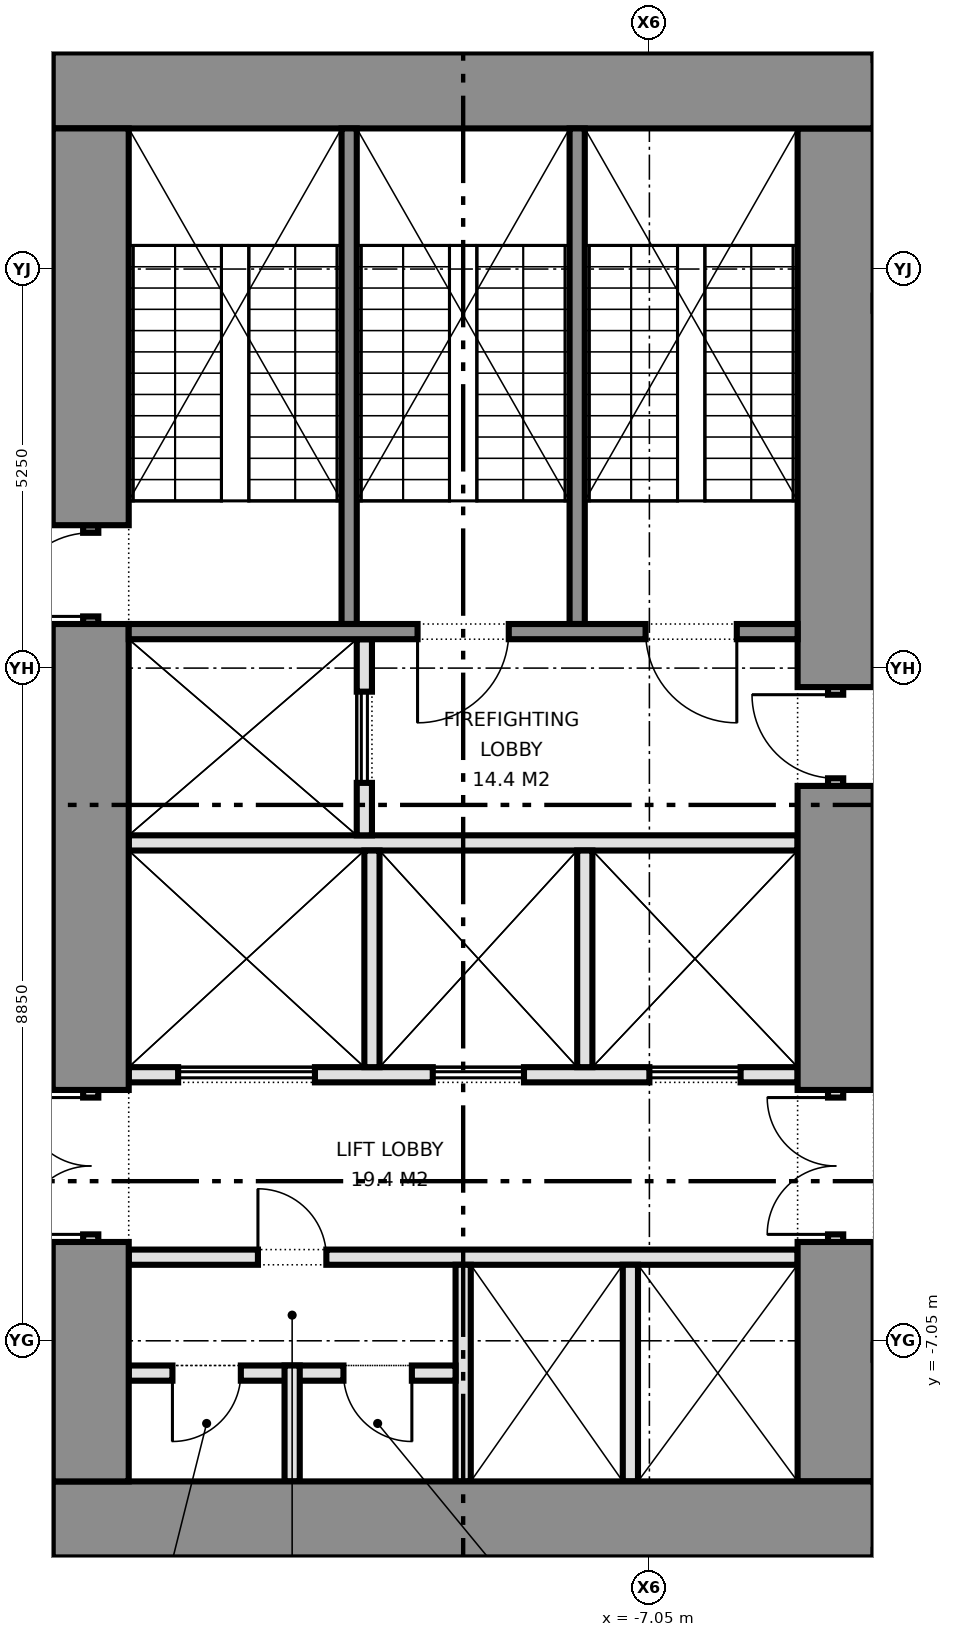
"""IFC4 building model, lengths in metres.
Left out: names, types, materials, properties, quantities, classifications, styles, units other than length and angle.
Written with IfcOpenShell. Run it as: python <this file> out.ifc"""

import sys

from ifc_helpers import new_model, si_unit, direction, frame, frame_2d, origin, place, context, subcontext, project, spatial, rectangle, extrude, element, fill, save


model = new_model("IFC4")
c1 = context("Model", 3, precision=1e-05, world=origin(), true_north=direction((0.0, 1.0)))
c2 = subcontext(c1, "Body", "Model", "MODEL_VIEW")
j1 = project(units=[si_unit("LENGTHUNIT", "METRE"), si_unit("PLANEANGLEUNIT", "RADIAN")], contexts=[c1])
p1 = place(None, origin())
s1 = spatial("IfcSite", under=j1, at=p1, CompositionType="ELEMENT")
p2 = place(p1, origin())
s2 = spatial("IfcBuilding", under=s1, at=p2, CompositionType="ELEMENT")
p3 = place(p2, frame((0.0, 0.0, 104.0)))
s3 = spatial("IfcBuildingStorey", under=s2, at=p3, CompositionType="ELEMENT", Elevation=104.0)
for number, where, z_axis, x_axis in (
    (1, (-14.9, -9.4, 0.0), (0.0, 0.0, 1.0), (1.0, 0.0, 0.0)),
    (2, (-14.9, 9.4, 0.0), (0.0, 0.0, 1.0), (1.0, 0.0, 0.0)),
):
    element("IfcWall", number, at=place(p3, frame(where, z_axis=z_axis, x_axis=x_axis)), inside=s3, PredefinedType="SHEAR", context=c2, shape_type="SweptSolid", body=[
        extrude(rectangle(XDim=10.8, YDim=1.0, at=frame_2d((5.4, 0.0))), origin(), (0.0, 0.0, 1.0), 4.2),
    ])
p4 = place(p3, frame((-14.4, -8.9, 0.0), z_axis=(0.0, 0.0, 1.0), x_axis=(0.0, 1.0, 0.0)))
e3 = element("IfcWall", 3, at=p4, inside=s3, PredefinedType="SHEAR", context=c2, shape_type="SweptSolid", body=[
    extrude(rectangle(XDim=3.15, YDim=1.0, at=frame_2d((1.575, 0.0))), origin(), (0.0, 0.0, 1.0), 4.2),
])
p5 = place(p3, frame((-14.4, -5.75, 0.0), z_axis=(0.0, 0.0, 1.0), x_axis=(0.0, 1.0, 0.0)))
e4 = element("IfcWall", 4, at=p5, inside=s3, PredefinedType="PARTITIONING", context=c2, shape_type="SweptSolid", body=[
    extrude(rectangle(XDim=2.0, YDim=0.2, at=frame_2d((1.0, 0.0))), origin(), (0.0, 0.0, 1.0), 2.4),
])
p6 = place(p5, frame((0.1, 0.0, 0.0)))
e5 = element("IfcOpeningElement", 5, at=p6, cuts=e4, PredefinedType="OPENING", context=c2, shape_type="SweptSolid", body=[
    extrude(rectangle(XDim=1.8, YDim=2.1, at=frame_2d((0.9, 1.05))), frame((0.0, 0.11, 0.0), z_axis=(0.0, -1.0, 0.0), x_axis=(1.0, 0.0, 0.0)), (0.0, 0.0, 1.0), 0.22),
])
p7 = place(p3, frame((-14.4, -3.75, 0.0), z_axis=(0.0, 0.0, 1.0), x_axis=(0.0, 1.0, 0.0)))
e6 = element("IfcWall", 6, at=p7, inside=s3, PredefinedType="SHEAR", context=c2, shape_type="SweptSolid", body=[
    extrude(rectangle(XDim=6.13, YDim=1.0, at=frame_2d((3.065, 0.0))), origin(), (0.0, 0.0, 1.0), 4.2),
])
p8 = place(p3, frame((-14.4, 2.38, 0.0), z_axis=(0.0, 0.0, 1.0), x_axis=(0.0, 1.0, 0.0)))
e7 = element("IfcWall", 7, at=p8, inside=s3, PredefinedType="SHEAR", context=c2, shape_type="SweptSolid", body=[
    extrude(rectangle(XDim=1.3, YDim=0.2, at=frame_2d((0.65, 0.0))), origin(), (0.0, 0.0, 1.0), 2.4),
])
p9 = place(p8, frame((0.1, 0.0, 0.0)))
e8 = element("IfcOpeningElement", 8, at=p9, cuts=e7, PredefinedType="OPENING", context=c2, shape_type="SweptSolid", body=[
    extrude(rectangle(XDim=1.1, YDim=2.1, at=frame_2d((0.55, 1.05))), frame((0.0, 0.11, 0.0), z_axis=(0.0, -1.0, 0.0), x_axis=(1.0, 0.0, 0.0)), (0.0, 0.0, 1.0), 0.22),
])
p10 = place(p3, frame((-14.4, 3.68, 0.0), z_axis=(0.0, 0.0, 1.0), x_axis=(0.0, 1.0, 0.0)))
e9 = element("IfcWall", 9, at=p10, inside=s3, PredefinedType="SHEAR", context=c2, shape_type="SweptSolid", body=[
    extrude(rectangle(XDim=5.22, YDim=1.0, at=frame_2d((2.61, 0.0))), origin(), (0.0, 0.0, 1.0), 4.2),
])
p11 = place(p3, frame((-4.6, -8.9, 0.0), z_axis=(0.0, 0.0, 1.0), x_axis=(0.0, 1.0, 0.0)))
e10 = element("IfcWall", 10, at=p11, inside=s3, PredefinedType="SHEAR", context=c2, shape_type="SweptSolid", body=[
    extrude(rectangle(XDim=3.15, YDim=1.0, at=frame_2d((1.575, 0.0))), origin(), (0.0, 0.0, 1.0), 4.2),
])
p12 = place(p3, frame((-4.6, -5.75, 0.0), z_axis=(0.0, 0.0, 1.0), x_axis=(0.0, 1.0, 0.0)))
e11 = element("IfcWall", 11, at=p12, inside=s3, PredefinedType="PARTITIONING", context=c2, shape_type="SweptSolid", body=[
    extrude(rectangle(XDim=2.0, YDim=0.2, at=frame_2d((1.0, 0.0))), origin(), (0.0, 0.0, 1.0), 2.4),
])
p13 = place(p12, frame((0.1, 0.0, 0.0)))
e12 = element("IfcOpeningElement", 12, at=p13, cuts=e11, PredefinedType="OPENING", context=c2, shape_type="SweptSolid", body=[
    extrude(rectangle(XDim=1.8, YDim=2.1, at=frame_2d((0.9, 1.05))), frame((0.0, 0.11, 0.0), z_axis=(0.0, -1.0, 0.0), x_axis=(1.0, 0.0, 0.0)), (0.0, 0.0, 1.0), 0.22),
])
p14 = place(p3, frame((-4.6, -3.75, 0.0), z_axis=(0.0, 0.0, 1.0), x_axis=(0.0, 1.0, 0.0)))
e13 = element("IfcWall", 13, at=p14, inside=s3, PredefinedType="SHEAR", context=c2, shape_type="SweptSolid", body=[
    extrude(rectangle(XDim=4.0, YDim=1.0, at=frame_2d((2.0, 0.0))), origin(), (0.0, 0.0, 1.0), 4.2),
])
p15 = place(p3, frame((-4.6, 0.25, 0.0), z_axis=(0.0, 0.0, 1.0), x_axis=(0.0, 1.0, 0.0)))
e14 = element("IfcWall", 14, at=p15, inside=s3, PredefinedType="PARTITIONING", context=c2, shape_type="SweptSolid", body=[
    extrude(rectangle(XDim=1.3, YDim=0.2, at=frame_2d((0.65, 0.0))), origin(), (0.0, 0.0, 1.0), 2.4),
])
p16 = place(p15, frame((0.1, 0.0, 0.0)))
e15 = element("IfcOpeningElement", 15, at=p16, cuts=e14, PredefinedType="OPENING", context=c2, shape_type="SweptSolid", body=[
    extrude(rectangle(XDim=1.1, YDim=2.1, at=frame_2d((0.55, 1.05))), frame((0.0, 0.11, 0.0), z_axis=(0.0, -1.0, 0.0), x_axis=(1.0, 0.0, 0.0)), (0.0, 0.0, 1.0), 0.22),
])
p17 = place(p3, frame((-4.6, 1.55, 0.0), z_axis=(0.0, 0.0, 1.0), x_axis=(0.0, 1.0, 0.0)))
e16 = element("IfcWall", 16, at=p17, inside=s3, PredefinedType="SHEAR", context=c2, shape_type="SweptSolid", body=[
    extrude(rectangle(XDim=7.35, YDim=1.0, at=frame_2d((3.675, 0.0))), origin(), (0.0, 0.0, 1.0), 4.2),
])
p18 = place(p3, frame((-13.9, -5.95, 0.0), z_axis=(0.0, 0.0, 1.0), x_axis=(1.0, 0.0, 0.0)))
e17 = element("IfcWall", 17, at=p18, inside=s3, PredefinedType="PARTITIONING", context=c2, shape_type="SweptSolid", body=[
    extrude(rectangle(XDim=8.8, YDim=0.2, at=frame_2d((4.4, 0.0))), origin(), (0.0, 0.0, 1.0), 4.2),
])
p19 = place(p18, frame((1.7, 0.0, 0.0)))
e18 = element("IfcOpeningElement", 18, at=p19, cuts=e17, PredefinedType="OPENING", context=c2, shape_type="SweptSolid", body=[
    extrude(rectangle(XDim=0.9, YDim=2.1, at=frame_2d((0.45, 1.05))), frame((0.0, 0.11, 0.0), z_axis=(0.0, -1.0, 0.0), x_axis=(1.0, 0.0, 0.0)), (0.0, 0.0, 1.0), 0.22),
])
p20 = place(p3, frame((-13.9, -3.55, 0.0), z_axis=(0.0, 0.0, 1.0), x_axis=(1.0, 0.0, 0.0)))
e19 = element("IfcWall", 19, at=p20, inside=s3, PredefinedType="PARTITIONING", context=c2, shape_type="SweptSolid", body=[
    extrude(rectangle(XDim=8.8, YDim=0.2, at=frame_2d((4.4, 0.0))), origin(), (0.0, 0.0, 1.0), 4.2),
])
p21 = place(p20, frame((0.65, 0.0, 0.0)))
e20 = element("IfcOpeningElement", 20, at=p21, cuts=e19, PredefinedType="OPENING", context=c2, shape_type="SweptSolid", body=[
    extrude(rectangle(XDim=1.8, YDim=2.1, at=frame_2d((0.9, 1.05))), frame((0.0, 0.11, 0.0), z_axis=(0.0, -1.0, 0.0), x_axis=(1.0, 0.0, 0.0)), (0.0, 0.0, 1.0), 0.22),
])
p22 = place(p20, frame((4.0, 0.0, 0.0)))
e21 = element("IfcOpeningElement", 21, at=p22, cuts=e19, PredefinedType="OPENING", context=c2, shape_type="SweptSolid", body=[
    extrude(rectangle(XDim=1.2, YDim=2.1, at=frame_2d((0.6, 1.05))), frame((0.0, 0.11, 0.0), z_axis=(0.0, -1.0, 0.0), x_axis=(1.0, 0.0, 0.0)), (0.0, 0.0, 1.0), 0.22),
])
p23 = place(p20, frame((6.85, 0.0, 0.0)))
e22 = element("IfcOpeningElement", 22, at=p23, cuts=e19, PredefinedType="OPENING", context=c2, shape_type="SweptSolid", body=[
    extrude(rectangle(XDim=1.2, YDim=2.1, at=frame_2d((0.6, 1.05))), frame((0.0, 0.11, 0.0), z_axis=(0.0, -1.0, 0.0), x_axis=(1.0, 0.0, 0.0)), (0.0, 0.0, 1.0), 0.22),
])
p24 = place(p3, frame((-13.9, -0.5, 0.0), z_axis=(0.0, 0.0, 1.0), x_axis=(1.0, 0.0, 0.0)))
e23 = element("IfcWall", 23, at=p24, inside=s3, PredefinedType="PARTITIONING", context=c2, shape_type="SweptSolid", body=[
    extrude(rectangle(XDim=8.8, YDim=0.2, at=frame_2d((4.4, 0.0))), origin(), (0.0, 0.0, 1.0), 4.2),
])
p25 = place(p3, frame((-10.8, -0.4, 0.0), z_axis=(0.0, 0.0, 1.0), x_axis=(0.0, 1.0, 0.0)))
e24 = element("IfcWall", 24, at=p25, inside=s3, PredefinedType="PARTITIONING", context=c2, shape_type="SweptSolid", body=[
    extrude(rectangle(XDim=2.58, YDim=0.2, at=frame_2d((1.29, 0.0))), origin(), (0.0, 0.0, 1.0), 4.2),
])
p26 = place(p25, frame((0.69, 0.0, 0.0)))
e25 = element("IfcOpeningElement", 25, at=p26, cuts=e24, PredefinedType="OPENING", context=c2, shape_type="SweptSolid", body=[
    extrude(rectangle(XDim=1.2, YDim=2.1, at=frame_2d((0.6, 1.05))), frame((0.0, 0.11, 0.0), z_axis=(0.0, -1.0, 0.0), x_axis=(1.0, 0.0, 0.0)), (0.0, 0.0, 1.0), 0.22),
])
p27 = place(p3, frame((-13.9, 2.28, 0.0), z_axis=(0.0, 0.0, 1.0), x_axis=(1.0, 0.0, 0.0)))
e26 = element("IfcWall", 26, at=p27, inside=s3, PredefinedType="SHEAR", context=c2, shape_type="SweptSolid", body=[
    extrude(rectangle(XDim=8.8, YDim=0.2, at=frame_2d((4.4, 0.0))), origin(), (0.0, 0.0, 1.0), 4.2),
])
p28 = place(p27, frame((3.8, 0.0, 0.0)))
e27 = element("IfcOpeningElement", 27, at=p28, cuts=e26, PredefinedType="OPENING", context=c2, shape_type="SweptSolid", body=[
    extrude(rectangle(XDim=1.2, YDim=2.1, at=frame_2d((0.6, 1.05))), frame((0.0, 0.11, 0.0), z_axis=(0.0, -1.0, 0.0), x_axis=(1.0, 0.0, 0.0)), (0.0, 0.0, 1.0), 0.22),
])
p29 = place(p27, frame((6.8, 0.0, 0.0)))
e28 = element("IfcOpeningElement", 28, at=p29, cuts=e26, PredefinedType="OPENING", context=c2, shape_type="SweptSolid", body=[
    extrude(rectangle(XDim=1.2, YDim=2.1, at=frame_2d((0.6, 1.05))), frame((0.0, 0.11, 0.0), z_axis=(0.0, -1.0, 0.0), x_axis=(1.0, 0.0, 0.0)), (0.0, 0.0, 1.0), 0.22),
])
for number, where, z_axis, x_axis in (
    (29, (-11.0, 2.38, 0.0), (0.0, 0.0, 1.0), (0.0, 1.0, 0.0)),
    (30, (-8.0, 2.38, 0.0), (0.0, 0.0, 1.0), (0.0, 1.0, 0.0)),
):
    element("IfcWall", number, at=place(p3, frame(where, z_axis=z_axis, x_axis=x_axis)), inside=s3, PredefinedType="SHEAR", context=c2, shape_type="SweptSolid", body=[
        extrude(rectangle(XDim=6.52, YDim=0.2, at=frame_2d((3.26, 0.0))), origin(), (0.0, 0.0, 1.0), 4.2),
    ])
for number, where, z_axis, x_axis in (
    (31, (-9.5, -8.9, 0.0), (0.0, 0.0, 1.0), (0.0, 1.0, 0.0)),
    (32, (-7.3, -8.9, 0.0), (0.0, 0.0, 1.0), (0.0, 1.0, 0.0)),
):
    element("IfcWall", number, at=place(p3, frame(where, z_axis=z_axis, x_axis=x_axis)), inside=s3, PredefinedType="PARTITIONING", context=c2, shape_type="SweptSolid", body=[
        extrude(rectangle(XDim=2.85, YDim=0.2, at=frame_2d((1.425, 0.0))), origin(), (0.0, 0.0, 1.0), 4.2),
    ])
p30 = place(p3, frame((-13.9, -7.475, 0.0), z_axis=(0.0, 0.0, 1.0), x_axis=(1.0, 0.0, 0.0)))
e33 = element("IfcWall", 33, at=p30, inside=s3, PredefinedType="PARTITIONING", context=c2, shape_type="SweptSolid", body=[
    extrude(rectangle(XDim=4.3, YDim=0.2, at=frame_2d((2.15, 0.0))), origin(), (0.0, 0.0, 1.0), 4.2),
])
p31 = place(p30, frame((0.575, 0.0, 0.0)))
e34 = element("IfcOpeningElement", 34, at=p31, cuts=e33, PredefinedType="OPENING", context=c2, shape_type="SweptSolid", body=[
    extrude(rectangle(XDim=0.9, YDim=2.1, at=frame_2d((0.45, 1.05))), frame((0.0, 0.11, 0.0), z_axis=(0.0, -1.0, 0.0), x_axis=(1.0, 0.0, 0.0)), (0.0, 0.0, 1.0), 0.22),
])
p32 = place(p30, frame((2.825, 0.0, 0.0)))
e35 = element("IfcOpeningElement", 35, at=p32, cuts=e33, PredefinedType="OPENING", context=c2, shape_type="SweptSolid", body=[
    extrude(rectangle(XDim=0.9, YDim=2.1, at=frame_2d((0.45, 1.05))), frame((0.0, 0.11, 0.0), z_axis=(0.0, -1.0, 0.0), x_axis=(1.0, 0.0, 0.0)), (0.0, 0.0, 1.0), 0.22),
])
p33 = place(p3, frame((-11.75, -8.9, 0.0), z_axis=(0.0, 0.0, 1.0), x_axis=(0.0, 1.0, 0.0)))
e36 = element("IfcWall", 36, at=p33, inside=s3, PredefinedType="PARTITIONING", context=c2, shape_type="SweptSolid", body=[
    extrude(rectangle(XDim=1.525, YDim=0.2, at=frame_2d((0.762, 0.0))), origin(), (0.0, 0.0, 1.0), 4.2),
])
for number, where, z_axis, x_axis in (
    (37, (-10.7, -3.45, 0.0), (0.0, 0.0, 1.0), (0.0, 1.0, 0.0)),
    (38, (-7.9, -3.45, 0.0), (0.0, 0.0, 1.0), (0.0, 1.0, 0.0)),
):
    element("IfcWall", number, at=place(p3, frame(where, z_axis=z_axis, x_axis=x_axis)), inside=s3, PredefinedType="PARTITIONING", context=c2, shape_type="SweptSolid", body=[
        extrude(rectangle(XDim=2.85, YDim=0.2, at=frame_2d((1.425, 0.0))), origin(), (0.0, 0.0, 1.0), 4.2),
    ])
p34 = place(p6, origin())
e39 = element("IfcDoor", 39, at=p34, inside=s3, OperationType="DOUBLE_DOOR_SINGLE_SWING", PredefinedType="DOOR", context=c2, shape_type="SweptSolid", body=[
    extrude(rectangle(XDim=1.8, YDim=2.1, at=frame_2d((0.9, 1.05))), frame((0.0, 0.025, 0.0), z_axis=(0.0, -1.0, 0.0), x_axis=(1.0, 0.0, 0.0)), (0.0, 0.0, 1.0), 0.05),
])
fill(e5, e39)
p35 = place(p9, origin())
e40 = element("IfcDoor", 40, at=p35, inside=s3, OperationType="SINGLE_SWING_LEFT", PredefinedType="DOOR", context=c2, shape_type="SweptSolid", body=[
    extrude(rectangle(XDim=1.1, YDim=2.1, at=frame_2d((0.55, 1.05))), frame((0.0, 0.025, 0.0), z_axis=(0.0, -1.0, 0.0), x_axis=(1.0, 0.0, 0.0)), (0.0, 0.0, 1.0), 0.05),
])
fill(e8, e40)
p36 = place(p13, origin())
e41 = element("IfcDoor", 41, at=p36, inside=s3, OperationType="DOUBLE_DOOR_SINGLE_SWING", PredefinedType="DOOR", context=c2, shape_type="SweptSolid", body=[
    extrude(rectangle(XDim=1.8, YDim=2.1, at=frame_2d((0.9, 1.05))), frame((0.0, 0.025, 0.0), z_axis=(0.0, -1.0, 0.0), x_axis=(1.0, 0.0, 0.0)), (0.0, 0.0, 1.0), 0.05),
])
fill(e12, e41)
p37 = place(p16, origin())
e42 = element("IfcDoor", 42, at=p37, inside=s3, OperationType="SINGLE_SWING_RIGHT", PredefinedType="DOOR", context=c2, shape_type="SweptSolid", body=[
    extrude(rectangle(XDim=1.1, YDim=2.1, at=frame_2d((0.55, 1.05))), frame((0.0, 0.025, 0.0), z_axis=(0.0, -1.0, 0.0), x_axis=(1.0, 0.0, 0.0)), (0.0, 0.0, 1.0), 0.05),
])
fill(e15, e42)
p38 = place(p21, origin())
e43 = element("IfcDoor", 43, at=p38, inside=s3, OperationType="DOUBLE_DOOR_SLIDING", PredefinedType="DOOR", context=c2, shape_type="SweptSolid", body=[
    extrude(rectangle(XDim=1.8, YDim=2.1, at=frame_2d((0.9, 1.05))), frame((0.0, 0.025, 0.0), z_axis=(0.0, -1.0, 0.0), x_axis=(1.0, 0.0, 0.0)), (0.0, 0.0, 1.0), 0.05),
])
fill(e20, e43)
p39 = place(p22, origin())
e44 = element("IfcDoor", 44, at=p39, inside=s3, OperationType="DOUBLE_DOOR_SLIDING", PredefinedType="DOOR", context=c2, shape_type="SweptSolid", body=[
    extrude(rectangle(XDim=1.2, YDim=2.1, at=frame_2d((0.6, 1.05))), frame((0.0, 0.025, 0.0), z_axis=(0.0, -1.0, 0.0), x_axis=(1.0, 0.0, 0.0)), (0.0, 0.0, 1.0), 0.05),
])
fill(e21, e44)
p40 = place(p23, origin())
e45 = element("IfcDoor", 45, at=p40, inside=s3, OperationType="DOUBLE_DOOR_SLIDING", PredefinedType="DOOR", context=c2, shape_type="SweptSolid", body=[
    extrude(rectangle(XDim=1.2, YDim=2.1, at=frame_2d((0.6, 1.05))), frame((0.0, 0.025, 0.0), z_axis=(0.0, -1.0, 0.0), x_axis=(1.0, 0.0, 0.0)), (0.0, 0.0, 1.0), 0.05),
])
fill(e22, e45)
p41 = place(p26, origin())
e46 = element("IfcDoor", 46, at=p41, inside=s3, OperationType="DOUBLE_DOOR_SLIDING", PredefinedType="DOOR", context=c2, shape_type="SweptSolid", body=[
    extrude(rectangle(XDim=1.2, YDim=2.1, at=frame_2d((0.6, 1.05))), frame((0.0, 0.025, 0.0), z_axis=(0.0, -1.0, 0.0), x_axis=(1.0, 0.0, 0.0)), (0.0, 0.0, 1.0), 0.05),
])
fill(e25, e46)
p42 = place(p19, origin())
e47 = element("IfcDoor", 47, at=p42, inside=s3, OperationType="SINGLE_SWING_LEFT", PredefinedType="DOOR", context=c2, shape_type="SweptSolid", body=[
    extrude(rectangle(XDim=0.9, YDim=2.1, at=frame_2d((0.45, 1.05))), frame((0.0, 0.025, 0.0), z_axis=(0.0, -1.0, 0.0), x_axis=(1.0, 0.0, 0.0)), (0.0, 0.0, 1.0), 0.05),
])
fill(e18, e47)
p43 = place(p31, frame((0.9, 0.0, 0.0), z_axis=(0.0, 0.0, 1.0), x_axis=(-1.0, 0.0, 0.0)))
e48 = element("IfcDoor", 48, at=p43, inside=s3, OperationType="SINGLE_SWING_RIGHT", PredefinedType="DOOR", context=c2, shape_type="SweptSolid", body=[
    extrude(rectangle(XDim=0.9, YDim=2.1, at=frame_2d((0.45, 1.05))), frame((0.0, 0.025, 0.0), z_axis=(0.0, -1.0, 0.0), x_axis=(1.0, 0.0, 0.0)), (0.0, 0.0, 1.0), 0.05),
])
fill(e34, e48)
p44 = place(p32, frame((0.9, 0.0, 0.0), z_axis=(0.0, 0.0, 1.0), x_axis=(-1.0, 0.0, 0.0)))
e49 = element("IfcDoor", 49, at=p44, inside=s3, OperationType="SINGLE_SWING_LEFT", PredefinedType="DOOR", context=c2, shape_type="SweptSolid", body=[
    extrude(rectangle(XDim=0.9, YDim=2.1, at=frame_2d((0.45, 1.05))), frame((0.0, 0.025, 0.0), z_axis=(0.0, -1.0, 0.0), x_axis=(1.0, 0.0, 0.0)), (0.0, 0.0, 1.0), 0.05),
])
fill(e35, e49)
p45 = place(p28, frame((1.2, 0.0, 0.0), z_axis=(0.0, 0.0, 1.0), x_axis=(-1.0, 0.0, 0.0)))
e50 = element("IfcDoor", 50, at=p45, inside=s3, OperationType="SINGLE_SWING_RIGHT", PredefinedType="DOOR", context=c2, shape_type="SweptSolid", body=[
    extrude(rectangle(XDim=1.2, YDim=2.1, at=frame_2d((0.6, 1.05))), frame((0.0, 0.025, 0.0), z_axis=(0.0, -1.0, 0.0), x_axis=(1.0, 0.0, 0.0)), (0.0, 0.0, 1.0), 0.05),
])
fill(e27, e50)
p46 = place(p29, frame((1.2, 0.0, 0.0), z_axis=(0.0, 0.0, 1.0), x_axis=(-1.0, 0.0, 0.0)))
e51 = element("IfcDoor", 51, at=p46, inside=s3, OperationType="SINGLE_SWING_LEFT", PredefinedType="DOOR", context=c2, shape_type="SweptSolid", body=[
    extrude(rectangle(XDim=1.2, YDim=2.1, at=frame_2d((0.6, 1.05))), frame((0.0, 0.025, 0.0), z_axis=(0.0, -1.0, 0.0), x_axis=(1.0, 0.0, 0.0)), (0.0, 0.0, 1.0), 0.05),
])
fill(e28, e51)
save(model, sys.argv[1])
